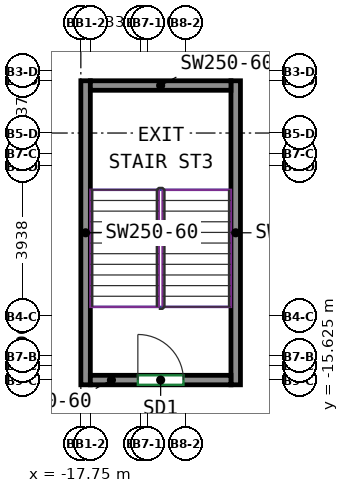
"""IFC4 building model, lengths in metres.
Left out: names, types, materials, properties, quantities, classifications, styles, units other than length and angle.
Written with IfcOpenShell. Run it as: python <this file> out.ifc"""

import sys

from ifc_helpers import new_model, si_unit, direction, frame, frame_2d, origin, place, context, subcontext, project, spatial, rectangle, extrude, source, transform, mapped, element, fill, save


model = new_model("IFC4")
c1 = context("Model", 3, precision=1e-05, world=origin(), true_north=direction((0.0, 1.0)))
c2 = subcontext(c1, "Body", "Model", "MODEL_VIEW")
j1 = project(units=[si_unit("LENGTHUNIT", "METRE"), si_unit("PLANEANGLEUNIT", "RADIAN")], contexts=[c1])
p1 = place(None, origin())
s1 = spatial("IfcSite", under=j1, at=p1, CompositionType="ELEMENT")
p2 = place(p1, origin())
s2 = spatial("IfcBuilding", under=s1, at=p2, CompositionType="ELEMENT")
p3 = place(p2, frame((0.0, 0.0, 195.7)))
s3 = spatial("IfcBuildingStorey", under=s2, at=p3, CompositionType="ELEMENT", Elevation=195.7)
m1 = source(origin(), c2, "Body", "SweptSolid", [
    extrude(rectangle(XDim=8.0, YDim=0.25, at=frame_2d((4.0, 0.0))), origin(), (0.0, 0.0, 1.0), 3.8),
])
for number, where, z_axis, x_axis in (
    (1, (-17.625, -15.75, 0.0), (0.0, 0.0, 1.0), (0.0, 1.0, 0.0)),
    (2, (-13.675, -15.75, 0.0), (0.0, 0.0, 1.0), (0.0, 1.0, 0.0)),
):
    element("IfcWall", number, at=place(p3, frame(where, z_axis=z_axis, x_axis=x_axis)), inside=s3, PredefinedType="SHEAR", context=c2, shape_type="MappedRepresentation", body=[
        mapped(m1, transform((0.0, 0.0, 0.0))),
    ])
m2 = source(origin(), c2, "Body", "SweptSolid", [
    extrude(rectangle(XDim=3.7, YDim=0.25, at=frame_2d((1.85, 0.0))), origin(), (0.0, 0.0, 1.0), 3.8),
])
p4 = place(p3, frame((-17.5, -15.625, 0.0), z_axis=(0.0, 0.0, 1.0), x_axis=(1.0, 0.0, 0.0)))
e3 = element("IfcWall", 3, at=p4, inside=s3, PredefinedType="SHEAR", context=c2, shape_type="MappedRepresentation", body=[
    mapped(m2, transform((0.0, 0.0, 0.0))),
])
p5 = place(p4, frame((1.25, 0.0, 0.0)))
e4 = element("IfcOpeningElement", 4, at=p5, cuts=e3, PredefinedType="OPENING", context=c2, shape_type="SweptSolid", body=[
    extrude(rectangle(XDim=1.2, YDim=2.1, at=frame_2d((0.6, 1.05))), frame((0.0, 0.135, 0.0), z_axis=(0.0, -1.0, 0.0), x_axis=(1.0, 0.0, 0.0)), (0.0, 0.0, 1.0), 0.27),
])
p6 = place(p3, frame((-17.5, -7.875, 0.0), z_axis=(0.0, 0.0, 1.0), x_axis=(1.0, 0.0, 0.0)))
e5 = element("IfcWall", 5, at=p6, inside=s3, PredefinedType="SHEAR", context=c2, shape_type="MappedRepresentation", body=[
    mapped(m2, transform((0.0, 0.0, 0.0))),
])
p7 = place(p5, origin())
e6 = element("IfcDoor", 6, at=p7, inside=s3, OperationType="DOUBLE_DOOR_SINGLE_SWING", PredefinedType="DOOR", context=c2, shape_type="SweptSolid", body=[
    extrude(rectangle(XDim=1.2, YDim=2.1, at=frame_2d((0.6, 1.05))), frame((0.0, 0.025, 0.0), z_axis=(0.0, -1.0, 0.0), x_axis=(1.0, 0.0, 0.0)), (0.0, 0.0, 1.0), 0.05),
])
fill(e4, e6)
save(model, sys.argv[1])
